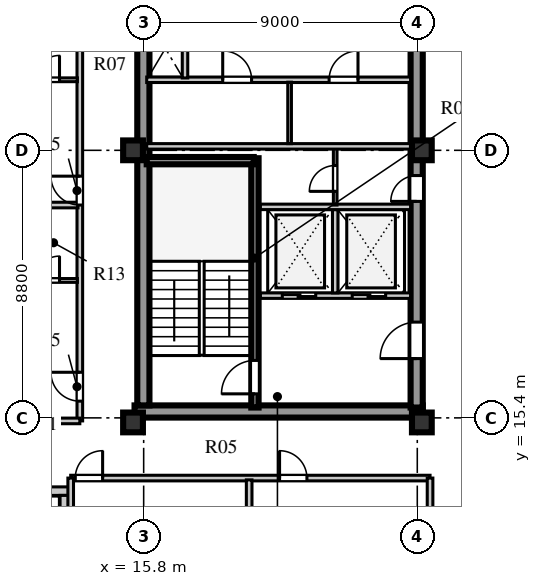
"""IFC4 building model, lengths in metres.
Left out: names, types, materials, properties, quantities, classifications, styles, units other than length and angle.
Written with IfcOpenShell. Run it as: python <this file> out.ifc"""

import sys

from ifc_helpers import new_model, si_unit, direction, frame, frame_2d, origin, origin_2d, place, context, subcontext, project, spatial, rectangle, extrude, element, fill, save


model = new_model("IFC4")
c1 = context("Model", 3, precision=1e-05, world=origin(), true_north=direction((0.0, 1.0)))
c2 = subcontext(c1, "Body", "Model", "MODEL_VIEW")
j1 = project(units=[si_unit("LENGTHUNIT", "METRE"), si_unit("PLANEANGLEUNIT", "RADIAN")], contexts=[c1])
p1 = place(None, origin())
s1 = spatial("IfcSite", under=j1, at=p1, CompositionType="ELEMENT")
p2 = place(p1, origin())
s2 = spatial("IfcBuilding", under=s1, at=p2, CompositionType="ELEMENT")
p3 = place(p2, frame((0.0, 0.0, 260.9)))
s3 = spatial("IfcBuildingStorey", under=s2, at=p3, CompositionType="ELEMENT", Elevation=260.9)
p4 = place(p3, frame((15.5, 15.61, 0.0), z_axis=(0.0, 0.0, 1.0), x_axis=(1.0, 0.0, 0.0)))
e1 = element("IfcWall", 1, at=p4, inside=s3, PredefinedType="SHEAR", context=c2, shape_type="SweptSolid", body=[
    extrude(rectangle(XDim=9.48, YDim=0.4, at=frame_2d((4.74, 0.0))), origin(), (0.0, 0.0, 1.0), 3.66),
])
p5 = place(p3, frame((15.79, 15.81, 0.0), z_axis=(0.0, 0.0, 1.0), x_axis=(0.0, 1.0, 0.0)))
e2 = element("IfcWall", 2, at=p5, inside=s3, PredefinedType="SHEAR", context=c2, shape_type="SweptSolid", body=[
    extrude(rectangle(XDim=25.63, YDim=0.4, at=frame_2d((12.815, 0.0))), origin(), (0.0, 0.0, 1.0), 3.66),
])
p6 = place(p3, frame((24.78, 15.74, 0.0), z_axis=(0.0, 0.0, 1.0), x_axis=(0.0, 1.0, 0.0)))
e3 = element("IfcWall", 3, at=p6, inside=s3, PredefinedType="SHEAR", context=c2, shape_type="SweptSolid", body=[
    extrude(rectangle(XDim=25.76, YDim=0.4, at=frame_2d((12.88, 0.0))), origin(), (0.0, 0.0, 1.0), 3.66),
])
p7 = place(p6, frame((1.61, 0.0, 0.0)))
e4 = element("IfcOpeningElement", 4, at=p7, cuts=e3, PredefinedType="OPENING", context=c2, shape_type="SweptSolid", body=[
    extrude(rectangle(XDim=1.2, YDim=2.1, at=frame_2d((0.6, 1.05))), frame((0.0, 0.21, 0.0), z_axis=(0.0, -1.0, 0.0), x_axis=(1.0, 0.0, 0.0)), (0.0, 0.0, 1.0), 0.42),
])
p8 = place(p6, frame((6.78, 0.0, 0.0)))
e5 = element("IfcOpeningElement", 5, at=p8, cuts=e3, PredefinedType="OPENING", context=c2, shape_type="SweptSolid", body=[
    extrude(rectangle(XDim=0.85, YDim=2.06, at=frame_2d((0.425, 1.03))), frame((0.0, 0.21, 0.0), z_axis=(0.0, -1.0, 0.0), x_axis=(1.0, 0.0, 0.0)), (0.0, 0.0, 1.0), 0.42),
])
p9 = place(p6, frame((12.11, 0.0, 0.0)))
e6 = element("IfcOpeningElement", 6, at=p9, cuts=e3, PredefinedType="OPENING", context=c2, shape_type="SweptSolid", body=[
    extrude(rectangle(XDim=1.5, YDim=2.12, at=frame_2d((0.75, 1.06))), frame((0.0, 0.21, 0.0), z_axis=(0.0, -1.0, 0.0), x_axis=(1.0, 0.0, 0.0)), (0.0, 0.0, 1.0), 0.42),
])
p10 = place(p6, frame((20.11, 0.0, 0.0)))
e7 = element("IfcOpeningElement", 7, at=p10, cuts=e3, PredefinedType="OPENING", context=c2, shape_type="SweptSolid", body=[
    extrude(rectangle(XDim=1.2, YDim=2.12, at=frame_2d((0.6, 1.06))), frame((0.0, 0.21, 0.0), z_axis=(0.0, -1.0, 0.0), x_axis=(1.0, 0.0, 0.0)), (0.0, 0.0, 1.0), 0.42),
])
p11 = place(p6, frame((24.01, 0.0, 0.0)))
e8 = element("IfcOpeningElement", 8, at=p11, cuts=e3, PredefinedType="OPENING", context=c2, shape_type="SweptSolid", body=[
    extrude(rectangle(XDim=0.95, YDim=2.1, at=frame_2d((0.475, 1.05))), frame((0.0, 0.21, 0.0), z_axis=(0.0, -1.0, 0.0), x_axis=(1.0, 0.0, 0.0)), (0.0, 0.0, 1.0), 0.42),
])
for number, where, z_axis, x_axis in (
    (9, (15.45, 15.25, 0.0), (0.0, 0.0, 1.0), (1.0, 0.0, 0.0)),
    (10, (15.45, 24.2, 0.0), (0.0, 0.0, 1.0), (1.0, 0.0, 0.0)),
    (11, (24.95, 15.25, 0.0), (0.0, 0.0, 1.0), (1.0, 0.0, 0.0)),
    (12, (24.95, 24.2, 0.0), (0.0, 0.0, 1.0), (1.0, 0.0, 0.0)),
):
    element("IfcColumn", number, at=place(p3, frame(where, z_axis=z_axis, x_axis=x_axis)), inside=s3, PredefinedType="COLUMN", context=c2, shape_type="SweptSolid", body=[
        extrude(rectangle(XDim=0.65, YDim=0.65, at=origin_2d()), origin(), (0.0, 0.0, 1.0), 3.66),
    ])
p12 = place(p3, frame((7.8, 12.99, 0.0), z_axis=(0.0, 0.0, 1.0), x_axis=(1.0, 0.0, 0.0)))
e13 = element("IfcWall", 13, at=p12, inside=s3, PredefinedType="STANDARD", context=c2, shape_type="SweptSolid", body=[
    extrude(rectangle(XDim=5.53, YDim=0.28, at=frame_2d((2.765, 0.0))), origin(), (0.0, 0.0, 1.0), 3.66),
])
p13 = place(p3, frame((13.19, 12.85, 0.0), z_axis=(0.0, 0.0, 1.0), x_axis=(0.0, -1.0, 0.0)))
e14 = element("IfcWall", 14, at=p13, inside=s3, PredefinedType="STANDARD", context=c2, shape_type="SweptSolid", body=[
    extrude(rectangle(XDim=4.97, YDim=0.28, at=frame_2d((2.485, 0.0))), origin(), (0.0, 0.0, 1.0), 3.66),
])
p14 = place(p3, frame((19.46, 15.74, 0.0), z_axis=(0.0, 0.0, 1.0), x_axis=(0.0, 1.0, 0.0)))
e15 = element("IfcWall", 15, at=p14, inside=s3, PredefinedType="SHEAR", context=c2, shape_type="SweptSolid", body=[
    extrude(rectangle(XDim=8.2, YDim=0.24, at=frame_2d((4.1, 0.0))), origin(), (0.0, 0.0, 1.0), 3.9),
])
p15 = place(p14, frame((0.45, 0.0, 0.0)))
e16 = element("IfcOpeningElement", 16, at=p15, cuts=e15, PredefinedType="OPENING", context=c2, shape_type="SweptSolid", body=[
    extrude(rectangle(XDim=1.1, YDim=2.1, at=frame_2d((0.55, 1.05))), frame((0.0, 0.13, 0.0), z_axis=(0.0, -1.0, 0.0), x_axis=(1.0, 0.0, 0.0)), (0.0, 0.0, 1.0), 0.26),
])
p16 = place(p3, frame((15.9, 23.86, 0.0), z_axis=(0.0, 0.0, 1.0), x_axis=(1.0, 0.0, 0.0)))
e17 = element("IfcWall", 17, at=p16, inside=s3, PredefinedType="SHEAR", context=c2, shape_type="SweptSolid", body=[
    extrude(rectangle(XDim=3.52, YDim=0.24, at=frame_2d((1.76, 0.0))), origin(), (0.0, 0.0, 1.0), 3.9),
])
p17 = place(p3, frame((19.64, 19.42, 0.0), z_axis=(0.0, 0.0, 1.0), x_axis=(1.0, 0.0, 0.0)))
e18 = element("IfcWall", 18, at=p17, inside=s3, PredefinedType="SOLIDWALL", context=c2, shape_type="SweptSolid", body=[
    extrude(rectangle(XDim=4.94, YDim=0.18, at=frame_2d((2.47, 0.0))), origin(), (0.0, 0.0, 1.0), 3.66),
])
p18 = place(p17, frame((0.72, 0.0, 0.0)))
e19 = element("IfcOpeningElement", 19, at=p18, cuts=e18, PredefinedType="OPENING", context=c2, shape_type="SweptSolid", body=[
    extrude(rectangle(XDim=1.1, YDim=2.1, at=frame_2d((0.55, 1.05))), frame((0.0, 0.1, 0.0), z_axis=(0.0, -1.0, 0.0), x_axis=(1.0, 0.0, 0.0)), (0.0, 0.0, 1.0), 0.2),
])
p19 = place(p17, frame((3.02, 0.0, 0.0)))
e20 = element("IfcOpeningElement", 20, at=p19, cuts=e18, PredefinedType="OPENING", context=c2, shape_type="SweptSolid", body=[
    extrude(rectangle(XDim=1.1, YDim=2.1, at=frame_2d((0.55, 1.05))), frame((0.0, 0.1, 0.0), z_axis=(0.0, -1.0, 0.0), x_axis=(1.0, 0.0, 0.0)), (0.0, 0.0, 1.0), 0.2),
])
p20 = place(p3, frame((22.1, 19.51, 0.0), z_axis=(0.0, 0.0, 1.0), x_axis=(0.0, 1.0, 0.0)))
e21 = element("IfcWall", 21, at=p20, inside=s3, PredefinedType="SOLIDWALL", context=c2, shape_type="SweptSolid", body=[
    extrude(rectangle(XDim=2.74, YDim=0.18, at=frame_2d((1.37, 0.0))), origin(), (0.0, 0.0, 1.0), 3.66),
])
p21 = place(p3, frame((19.64, 22.34, 0.0), z_axis=(0.0, 0.0, 1.0), x_axis=(1.0, 0.0, 0.0)))
e22 = element("IfcWall", 22, at=p21, inside=s3, PredefinedType="SOLIDWALL", context=c2, shape_type="SweptSolid", body=[
    extrude(rectangle(XDim=4.94, YDim=0.18, at=frame_2d((2.47, 0.0))), origin(), (0.0, 0.0, 1.0), 3.66),
])
p22 = place(p3, frame((22.1, 22.4, 0.0), z_axis=(0.0, 0.0, 1.0), x_axis=(0.0, 1.0, 0.0)))
e23 = element("IfcWall", 23, at=p22, inside=s3, PredefinedType="PARTITIONING", context=c2, shape_type="SweptSolid", body=[
    extrude(rectangle(XDim=1.88, YDim=0.12, at=frame_2d((0.94, 0.0))), origin(), (0.0, 0.0, 1.0), 3.66),
])
p23 = place(p22, frame((0.45, 0.0, 0.0)))
e24 = element("IfcOpeningElement", 24, at=p23, cuts=e23, PredefinedType="OPENING", context=c2, shape_type="SweptSolid", body=[
    extrude(rectangle(XDim=0.85, YDim=2.06, at=frame_2d((0.425, 1.03))), frame((0.0, 0.07, 0.0), z_axis=(0.0, -1.0, 0.0), x_axis=(1.0, 0.0, 0.0)), (0.0, 0.0, 1.0), 0.14),
])
p24 = place(p3, frame((15.9, 26.52, 0.0), z_axis=(0.0, 0.0, 1.0), x_axis=(1.0, 0.0, 0.0)))
e25 = element("IfcWall", 25, at=p24, inside=s3, PredefinedType="SOLIDWALL", context=c2, shape_type="SweptSolid", body=[
    extrude(rectangle(XDim=8.68, YDim=0.18, at=frame_2d((4.34, 0.0))), origin(), (0.0, 0.0, 1.0), 3.66),
])
p25 = place(p24, frame((2.5, 0.0, 0.0)))
e26 = element("IfcOpeningElement", 26, at=p25, cuts=e25, PredefinedType="OPENING", context=c2, shape_type="SweptSolid", body=[
    extrude(rectangle(XDim=0.95, YDim=2.1, at=frame_2d((0.475, 1.05))), frame((0.0, 0.1, 0.0), z_axis=(0.0, -1.0, 0.0), x_axis=(1.0, 0.0, 0.0)), (0.0, 0.0, 1.0), 0.2),
])
p26 = place(p24, frame((6.0, 0.0, 0.0)))
e27 = element("IfcOpeningElement", 27, at=p26, cuts=e25, PredefinedType="OPENING", context=c2, shape_type="SweptSolid", body=[
    extrude(rectangle(XDim=0.95, YDim=2.1, at=frame_2d((0.475, 1.05))), frame((0.0, 0.1, 0.0), z_axis=(0.0, -1.0, 0.0), x_axis=(1.0, 0.0, 0.0)), (0.0, 0.0, 1.0), 0.2),
])
p27 = place(p3, frame((15.9, 24.33, 0.0), z_axis=(0.0, 0.0, 1.0), x_axis=(1.0, 0.0, 0.0)))
e28 = element("IfcWall", 28, at=p27, inside=s3, PredefinedType="SOLIDWALL", context=c2, shape_type="SweptSolid", body=[
    extrude(rectangle(XDim=8.68, YDim=0.18, at=frame_2d((4.34, 0.0))), origin(), (0.0, 0.0, 1.0), 3.06),
])
p28 = place(p3, frame((20.6, 24.42, 0.0), z_axis=(0.0, 0.0, 1.0), x_axis=(0.0, 1.0, 0.0)))
e29 = element("IfcWall", 29, at=p28, inside=s3, PredefinedType="PARTITIONING", context=c2, shape_type="SweptSolid", body=[
    extrude(rectangle(XDim=2.02, YDim=0.12, at=frame_2d((1.01, 0.0))), origin(), (0.0, 0.0, 1.0), 3.66),
])
p29 = place(p3, frame((17.16, 26.58, 0.0), z_axis=(0.0, 0.0, 1.0), x_axis=(0.0, 1.0, 0.0)))
e30 = element("IfcWall", 30, at=p29, inside=s3, PredefinedType="SOLIDWALL", context=c2, shape_type="SweptSolid", body=[
    extrude(rectangle(XDim=4.02, YDim=0.18, at=frame_2d((2.01, 0.0))), origin(), (0.0, 0.0, 1.0), 3.66),
])
p30 = place(p29, frame((2.35, 0.0, 0.0)))
e31 = element("IfcOpeningElement", 31, at=p30, cuts=e30, PredefinedType="OPENING", context=c2, shape_type="SweptSolid", body=[
    extrude(rectangle(XDim=0.85, YDim=2.06, at=frame_2d((0.425, 1.03))), frame((0.0, 0.1, 0.0), z_axis=(0.0, -1.0, 0.0), x_axis=(1.0, 0.0, 0.0)), (0.0, 0.0, 1.0), 0.2),
])
p31 = place(p3, frame((13.4, 13.42, 0.0), z_axis=(0.0, 0.0, 1.0), x_axis=(1.0, 0.0, 0.0)))
e32 = element("IfcWall", 32, at=p31, inside=s3, PredefinedType="SOLIDWALL", context=c2, shape_type="SweptSolid", body=[
    extrude(rectangle(XDim=11.82, YDim=0.185, at=frame_2d((5.91, 0.0))), origin(), (0.0, 0.0, 1.0), 3.66),
])
p32 = place(p31, frame((0.15, 0.0, 0.0)))
e33 = element("IfcOpeningElement", 33, at=p32, cuts=e32, PredefinedType="OPENING", context=c2, shape_type="SweptSolid", body=[
    extrude(rectangle(XDim=0.9, YDim=2.08, at=frame_2d((0.45, 1.04))), frame((0.0, 0.103, 0.0), z_axis=(0.0, -1.0, 0.0), x_axis=(1.0, 0.0, 0.0)), (0.0, 0.0, 1.0), 0.205),
])
p33 = place(p31, frame((6.87, 0.0, 0.0)))
e34 = element("IfcOpeningElement", 34, at=p33, cuts=e32, PredefinedType="OPENING", context=c2, shape_type="SweptSolid", body=[
    extrude(rectangle(XDim=0.9, YDim=2.08, at=frame_2d((0.45, 1.04))), frame((0.0, 0.103, 0.0), z_axis=(0.0, -1.0, 0.0), x_axis=(1.0, 0.0, 0.0)), (0.0, 0.0, 1.0), 0.205),
])
p34 = place(p3, frame((13.4, 7.88, 0.0), z_axis=(0.0, 0.0, 1.0), x_axis=(0.0, 1.0, 0.0)))
e35 = element("IfcWall", 35, at=p34, inside=s3, PredefinedType="SOLIDWALL", context=c2, shape_type="SweptSolid", body=[
    extrude(rectangle(XDim=5.54, YDim=0.185, at=frame_2d((2.77, 0.0))), origin(), (0.0, 0.0, 1.0), 3.66),
])
p35 = place(p3, frame((25.22, 7.88, 0.0), z_axis=(0.0, 0.0, 1.0), x_axis=(0.0, 1.0, 0.0)))
e36 = element("IfcWall", 36, at=p35, inside=s3, PredefinedType="SOLIDWALL", context=c2, shape_type="SweptSolid", body=[
    extrude(rectangle(XDim=5.54, YDim=0.185, at=frame_2d((2.77, 0.0))), origin(), (0.0, 0.0, 1.0), 3.21),
])
p36 = place(p3, frame((19.27, 7.88, 0.0), z_axis=(0.0, 0.0, 1.0), x_axis=(0.0, 1.0, 0.0)))
e37 = element("IfcWall", 37, at=p36, inside=s3, PredefinedType="SOLIDWALL", context=c2, shape_type="SweptSolid", body=[
    extrude(rectangle(XDim=5.48, YDim=0.185, at=frame_2d((2.74, 0.0))), origin(), (0.0, 0.0, 1.0), 3.66),
])
p37 = place(p3, frame((13.7, 15.3, 0.0), z_axis=(0.0, 0.0, 1.0), x_axis=(0.0, 1.0, 0.0)))
e38 = element("IfcWall", 38, at=p37, inside=s3, PredefinedType="SOLIDWALL", context=c2, shape_type="SweptSolid", body=[
    extrude(rectangle(XDim=26.6, YDim=0.185, at=frame_2d((13.3, 0.0))), origin(), (0.0, 0.0, 1.0), 3.66),
])
p38 = place(p37, frame((0.65, 0.0, 0.0)))
e39 = element("IfcOpeningElement", 39, at=p38, cuts=e38, PredefinedType="OPENING", context=c2, shape_type="SweptSolid", body=[
    extrude(rectangle(XDim=0.95, YDim=2.1, at=frame_2d((0.475, 1.05))), frame((0.0, 0.103, 0.0), z_axis=(0.0, -1.0, 0.0), x_axis=(1.0, 0.0, 0.0)), (0.0, 0.0, 1.0), 0.205),
])
p39 = place(p37, frame((7.1, 0.0, 0.0)))
e40 = element("IfcOpeningElement", 40, at=p39, cuts=e38, PredefinedType="OPENING", context=c2, shape_type="SweptSolid", body=[
    extrude(rectangle(XDim=0.95, YDim=2.1, at=frame_2d((0.475, 1.05))), frame((0.0, 0.103, 0.0), z_axis=(0.0, -1.0, 0.0), x_axis=(1.0, 0.0, 0.0)), (0.0, 0.0, 1.0), 0.205),
])
p40 = place(p37, frame((14.35, 0.0, 0.0)))
e41 = element("IfcOpeningElement", 41, at=p40, cuts=e38, PredefinedType="OPENING", context=c2, shape_type="SweptSolid", body=[
    extrude(rectangle(XDim=0.95, YDim=2.1, at=frame_2d((0.475, 1.05))), frame((0.0, 0.103, 0.0), z_axis=(0.0, -1.0, 0.0), x_axis=(1.0, 0.0, 0.0)), (0.0, 0.0, 1.0), 0.205),
])
p41 = place(p3, frame((8.08, 15.3, 0.0), z_axis=(0.0, 0.0, 1.0), x_axis=(1.0, 0.0, 0.0)))
e42 = element("IfcWall", 42, at=p41, inside=s3, PredefinedType="SOLIDWALL", context=c2, shape_type="SweptSolid", body=[
    extrude(rectangle(XDim=5.62, YDim=0.185, at=frame_2d((2.81, 0.0))), origin(), (0.0, 0.0, 1.0), 3.21),
])
p42 = place(p3, frame((10.45, 19.92, 0.0), z_axis=(0.0, 0.0, 1.0), x_axis=(1.0, 0.0, 0.0)))
e43 = element("IfcWall", 43, at=p42, inside=s3, PredefinedType="PLUMBINGWALL", context=c2, shape_type="SweptSolid", body=[
    extrude(rectangle(XDim=3.17, YDim=0.125, at=frame_2d((1.585, 0.0))), origin(), (0.0, 0.0, 1.0), 3.66),
])
p43 = place(p42, frame((0.16, 0.0, 0.0)))
e44 = element("IfcOpeningElement", 44, at=p43, cuts=e43, PredefinedType="OPENING", context=c2, shape_type="SweptSolid", body=[
    extrude(rectangle(XDim=0.8, YDim=2.05, at=frame_2d((0.4, 1.025))), frame((0.0, 0.073, 0.0), z_axis=(0.0, -1.0, 0.0), x_axis=(1.0, 0.0, 0.0)), (0.0, 0.0, 1.0), 0.145),
])
p44 = place(p42, frame((1.782, 0.0, 0.0)))
e45 = element("IfcOpeningElement", 45, at=p44, cuts=e43, PredefinedType="OPENING", context=c2, shape_type="SweptSolid", body=[
    extrude(rectangle(XDim=0.8, YDim=2.05, at=frame_2d((0.4, 1.025))), frame((0.0, 0.073, 0.0), z_axis=(0.0, -1.0, 0.0), x_axis=(1.0, 0.0, 0.0)), (0.0, 0.0, 1.0), 0.145),
])
p45 = place(p3, frame((8.08, 22.4, 0.0), z_axis=(0.0, 0.0, 1.0), x_axis=(1.0, 0.0, 0.0)))
e46 = element("IfcWall", 46, at=p45, inside=s3, PredefinedType="SOLIDWALL", context=c2, shape_type="SweptSolid", body=[
    extrude(rectangle(XDim=5.56, YDim=0.185, at=frame_2d((2.78, 0.0))), origin(), (0.0, 0.0, 1.0), 3.66),
])
p46 = place(p3, frame((10.45, 26.52, 0.0), z_axis=(0.0, 0.0, 1.0), x_axis=(1.0, 0.0, 0.0)))
e47 = element("IfcWall", 47, at=p46, inside=s3, PredefinedType="PLUMBINGWALL", context=c2, shape_type="SweptSolid", body=[
    extrude(rectangle(XDim=3.17, YDim=0.125, at=frame_2d((1.585, 0.0))), origin(), (0.0, 0.0, 1.0), 3.66),
])
p47 = place(p46, frame((0.16, 0.0, 0.0)))
e48 = element("IfcOpeningElement", 48, at=p47, cuts=e47, PredefinedType="OPENING", context=c2, shape_type="SweptSolid", body=[
    extrude(rectangle(XDim=0.8, YDim=2.05, at=frame_2d((0.4, 1.025))), frame((0.0, 0.073, 0.0), z_axis=(0.0, -1.0, 0.0), x_axis=(1.0, 0.0, 0.0)), (0.0, 0.0, 1.0), 0.145),
])
p48 = place(p46, frame((1.782, 0.0, 0.0)))
e49 = element("IfcOpeningElement", 49, at=p48, cuts=e47, PredefinedType="OPENING", context=c2, shape_type="SweptSolid", body=[
    extrude(rectangle(XDim=0.8, YDim=2.05, at=frame_2d((0.4, 1.025))), frame((0.0, 0.073, 0.0), z_axis=(0.0, -1.0, 0.0), x_axis=(1.0, 0.0, 0.0)), (0.0, 0.0, 1.0), 0.145),
])
p49 = place(p15, origin())
e50 = element("IfcDoor", 50, at=p49, inside=s3, OperationType="SINGLE_SWING_LEFT", PredefinedType="DOOR", context=c2, shape_type="SweptSolid", body=[
    extrude(rectangle(XDim=1.1, YDim=2.1, at=frame_2d((0.55, 1.05))), frame((0.0, 0.025, 0.0), z_axis=(0.0, -1.0, 0.0), x_axis=(1.0, 0.0, 0.0)), (0.0, 0.0, 1.0), 0.05),
])
fill(e16, e50)
p50 = place(p18, origin())
e51 = element("IfcDoor", 51, at=p50, inside=s3, OperationType="DOUBLE_DOOR_SLIDING", PredefinedType="DOOR", context=c2, shape_type="SweptSolid", body=[
    extrude(rectangle(XDim=1.1, YDim=2.1, at=frame_2d((0.55, 1.05))), frame((0.0, 0.025, 0.0), z_axis=(0.0, -1.0, 0.0), x_axis=(1.0, 0.0, 0.0)), (0.0, 0.0, 1.0), 0.05),
])
fill(e19, e51)
p51 = place(p19, origin())
e52 = element("IfcDoor", 52, at=p51, inside=s3, OperationType="DOUBLE_DOOR_SLIDING", PredefinedType="DOOR", context=c2, shape_type="SweptSolid", body=[
    extrude(rectangle(XDim=1.1, YDim=2.1, at=frame_2d((0.55, 1.05))), frame((0.0, 0.025, 0.0), z_axis=(0.0, -1.0, 0.0), x_axis=(1.0, 0.0, 0.0)), (0.0, 0.0, 1.0), 0.05),
])
fill(e20, e52)
p52 = place(p7, frame((1.2, 0.0, 0.0), z_axis=(0.0, 0.0, 1.0), x_axis=(-1.0, 0.0, 0.0)))
e53 = element("IfcDoor", 53, at=p52, inside=s3, OperationType="SINGLE_SWING_RIGHT", PredefinedType="DOOR", context=c2, shape_type="SweptSolid", body=[
    extrude(rectangle(XDim=1.2, YDim=2.1, at=frame_2d((0.6, 1.05))), frame((0.0, 0.025, 0.0), z_axis=(0.0, -1.0, 0.0), x_axis=(1.0, 0.0, 0.0)), (0.0, 0.0, 1.0), 0.05),
])
fill(e4, e53)
p53 = place(p23, origin())
e54 = element("IfcDoor", 54, at=p53, inside=s3, OperationType="SINGLE_SWING_LEFT", PredefinedType="DOOR", context=c2, shape_type="SweptSolid", body=[
    extrude(rectangle(XDim=0.85, YDim=2.06, at=frame_2d((0.425, 1.03))), frame((0.0, 0.025, 0.0), z_axis=(0.0, -1.0, 0.0), x_axis=(1.0, 0.0, 0.0)), (0.0, 0.0, 1.0), 0.05),
])
fill(e24, e54)
p54 = place(p8, frame((0.85, 0.0, 0.0), z_axis=(0.0, 0.0, 1.0), x_axis=(-1.0, 0.0, 0.0)))
e55 = element("IfcDoor", 55, at=p54, inside=s3, OperationType="SINGLE_SWING_RIGHT", PredefinedType="DOOR", context=c2, shape_type="SweptSolid", body=[
    extrude(rectangle(XDim=0.85, YDim=2.06, at=frame_2d((0.425, 1.03))), frame((0.0, 0.025, 0.0), z_axis=(0.0, -1.0, 0.0), x_axis=(1.0, 0.0, 0.0)), (0.0, 0.0, 1.0), 0.05),
])
fill(e5, e55)
p55 = place(p25, origin())
e56 = element("IfcDoor", 56, at=p55, inside=s3, OperationType="SINGLE_SWING_LEFT", PredefinedType="DOOR", context=c2, shape_type="SweptSolid", body=[
    extrude(rectangle(XDim=0.95, YDim=2.1, at=frame_2d((0.475, 1.05))), frame((0.0, 0.025, 0.0), z_axis=(0.0, -1.0, 0.0), x_axis=(1.0, 0.0, 0.0)), (0.0, 0.0, 1.0), 0.05),
])
fill(e26, e56)
p56 = place(p26, origin())
e57 = element("IfcDoor", 57, at=p56, inside=s3, OperationType="SINGLE_SWING_RIGHT", PredefinedType="DOOR", context=c2, shape_type="SweptSolid", body=[
    extrude(rectangle(XDim=0.95, YDim=2.1, at=frame_2d((0.475, 1.05))), frame((0.0, 0.025, 0.0), z_axis=(0.0, -1.0, 0.0), x_axis=(1.0, 0.0, 0.0)), (0.0, 0.0, 1.0), 0.05),
])
fill(e27, e57)
p57 = place(p32, frame((0.9, 0.0, 0.0), z_axis=(0.0, 0.0, 1.0), x_axis=(-1.0, 0.0, 0.0)))
e58 = element("IfcDoor", 58, at=p57, inside=s3, OperationType="SINGLE_SWING_LEFT", PredefinedType="DOOR", context=c2, shape_type="SweptSolid", body=[
    extrude(rectangle(XDim=0.9, YDim=2.08, at=frame_2d((0.45, 1.04))), frame((0.0, 0.025, 0.0), z_axis=(0.0, -1.0, 0.0), x_axis=(1.0, 0.0, 0.0)), (0.0, 0.0, 1.0), 0.05),
])
fill(e33, e58)
p58 = place(p33, frame((0.9, 0.0, 0.0), z_axis=(0.0, 0.0, 1.0), x_axis=(-1.0, 0.0, 0.0)))
e59 = element("IfcDoor", 59, at=p58, inside=s3, OperationType="SINGLE_SWING_RIGHT", PredefinedType="DOOR", context=c2, shape_type="SweptSolid", body=[
    extrude(rectangle(XDim=0.9, YDim=2.08, at=frame_2d((0.45, 1.04))), frame((0.0, 0.025, 0.0), z_axis=(0.0, -1.0, 0.0), x_axis=(1.0, 0.0, 0.0)), (0.0, 0.0, 1.0), 0.05),
])
fill(e34, e59)
p59 = place(p44, origin())
e60 = element("IfcDoor", 60, at=p59, inside=s3, OperationType="SINGLE_SWING_RIGHT", PredefinedType="DOOR", context=c2, shape_type="SweptSolid", body=[
    extrude(rectangle(XDim=0.8, YDim=2.05, at=frame_2d((0.4, 1.025))), frame((0.0, 0.025, 0.0), z_axis=(0.0, -1.0, 0.0), x_axis=(1.0, 0.0, 0.0)), (0.0, 0.0, 1.0), 0.05),
])
fill(e45, e60)
p60 = place(p38, frame((0.95, 0.0, 0.0), z_axis=(0.0, 0.0, 1.0), x_axis=(-1.0, 0.0, 0.0)))
e61 = element("IfcDoor", 61, at=p60, inside=s3, OperationType="SINGLE_SWING_LEFT", PredefinedType="DOOR", context=c2, shape_type="SweptSolid", body=[
    extrude(rectangle(XDim=0.95, YDim=2.1, at=frame_2d((0.475, 1.05))), frame((0.0, 0.025, 0.0), z_axis=(0.0, -1.0, 0.0), x_axis=(1.0, 0.0, 0.0)), (0.0, 0.0, 1.0), 0.05),
])
fill(e39, e61)
p61 = place(p48, origin())
e62 = element("IfcDoor", 62, at=p61, inside=s3, OperationType="SINGLE_SWING_RIGHT", PredefinedType="DOOR", context=c2, shape_type="SweptSolid", body=[
    extrude(rectangle(XDim=0.8, YDim=2.05, at=frame_2d((0.4, 1.025))), frame((0.0, 0.025, 0.0), z_axis=(0.0, -1.0, 0.0), x_axis=(1.0, 0.0, 0.0)), (0.0, 0.0, 1.0), 0.05),
])
fill(e49, e62)
p62 = place(p39, frame((0.95, 0.0, 0.0), z_axis=(0.0, 0.0, 1.0), x_axis=(-1.0, 0.0, 0.0)))
e63 = element("IfcDoor", 63, at=p62, inside=s3, OperationType="SINGLE_SWING_LEFT", PredefinedType="DOOR", context=c2, shape_type="SweptSolid", body=[
    extrude(rectangle(XDim=0.95, YDim=2.1, at=frame_2d((0.475, 1.05))), frame((0.0, 0.025, 0.0), z_axis=(0.0, -1.0, 0.0), x_axis=(1.0, 0.0, 0.0)), (0.0, 0.0, 1.0), 0.05),
])
fill(e40, e63)
save(model, sys.argv[1])
